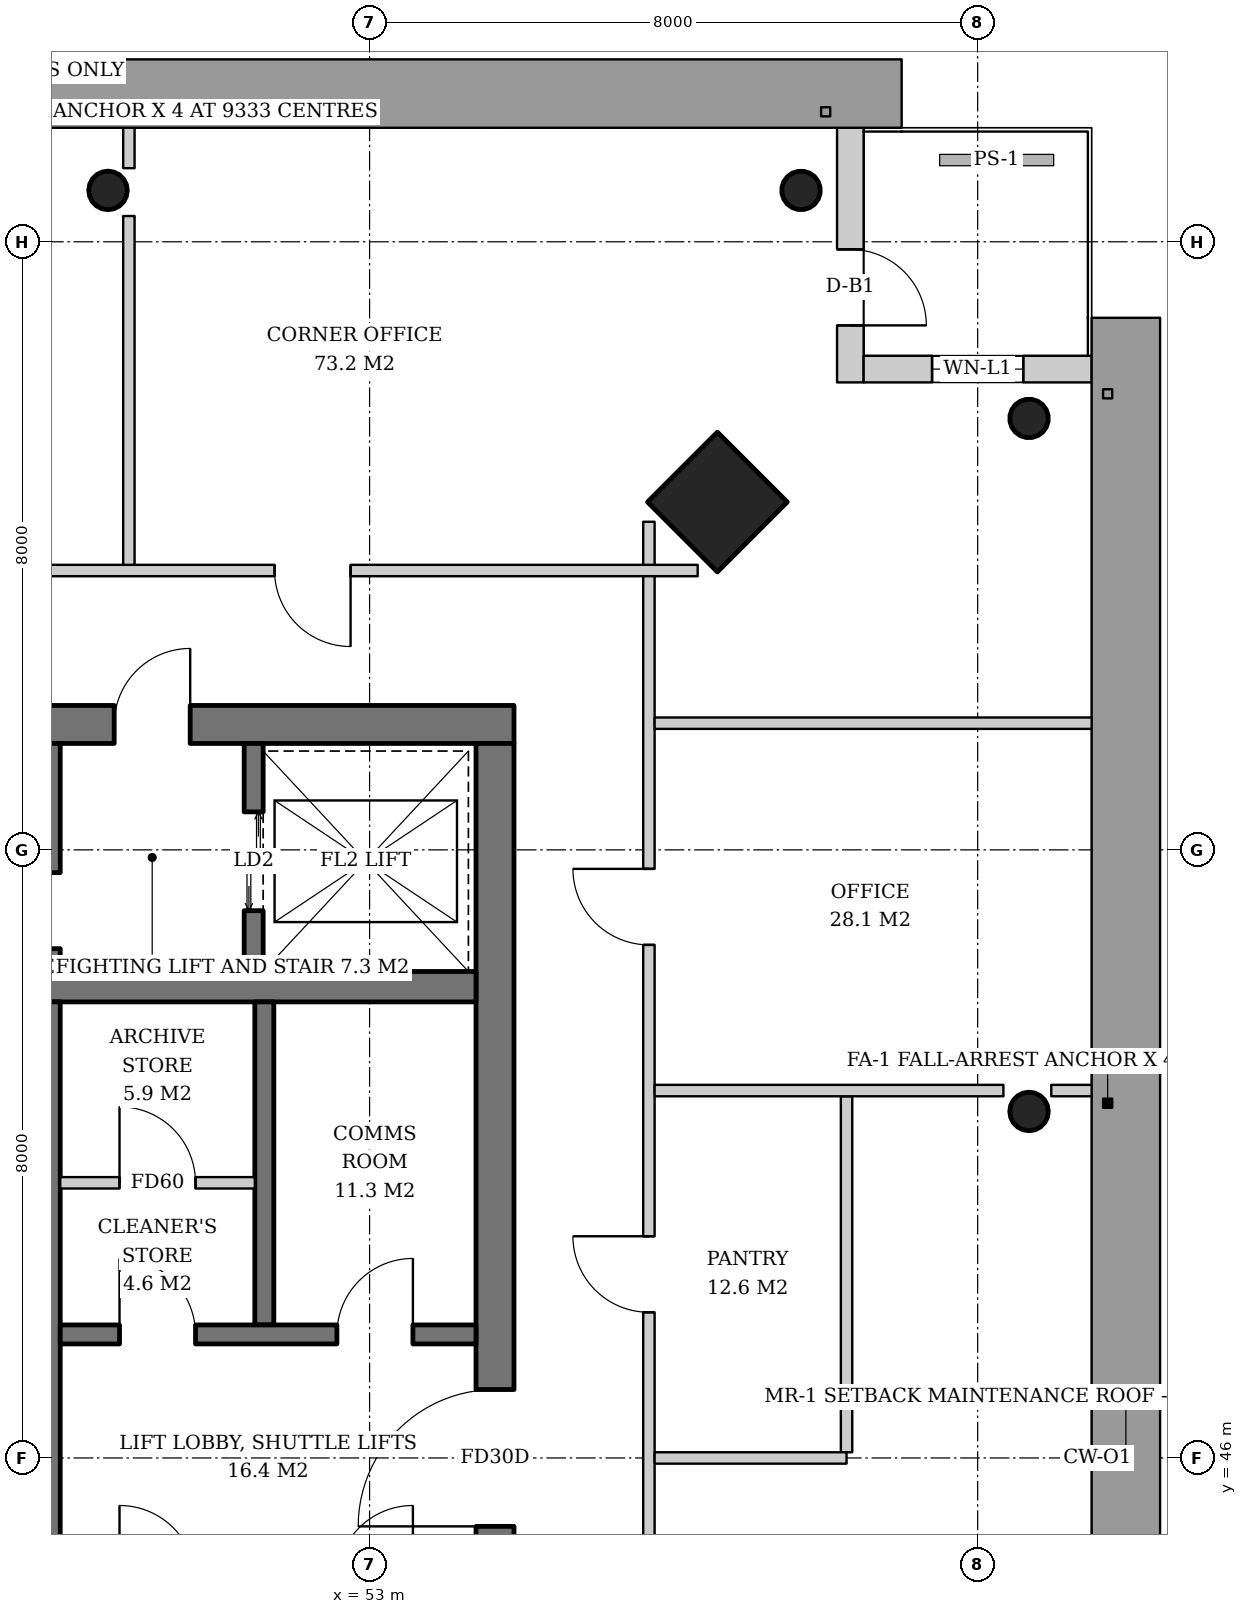
"""IFC4 building model, lengths in metres.
Left out: names, types, materials, properties, quantities, classifications, styles, units other than length and angle.
Written with IfcOpenShell. Run it as: python <this file> out.ifc"""

import sys

from ifc_helpers import new_model, si_unit, direction, frame, frame_2d, origin, origin_2d, place, context, subcontext, project, spatial, rectangle, hollow_circle, extrude, element, fill, save


model = new_model("IFC4")
c1 = context("Model", 3, precision=1e-05, world=origin(), true_north=direction((0.0, 1.0)))
c2 = subcontext(c1, "Body", "Model", "MODEL_VIEW")
j1 = project(units=[si_unit("LENGTHUNIT", "METRE"), si_unit("PLANEANGLEUNIT", "RADIAN")], contexts=[c1])
p1 = place(None, origin())
s1 = spatial("IfcSite", under=j1, at=p1, CompositionType="ELEMENT")
p2 = place(p1, origin())
s2 = spatial("IfcBuilding", under=s1, at=p2, CompositionType="ELEMENT")
p3 = place(p2, frame((0.0, 0.0, 249.0)))
s3 = spatial("IfcBuildingStorey", under=s2, at=p3, CompositionType="ELEMENT", Elevation=249.0)
p4 = place(p3, frame((57.614, 58.614, 0.0), z_axis=(-0.031898107953, -0.031898107953, 0.998981992539), x_axis=(0.707106781187, -0.707106781187, 0.0)))
e1 = element("IfcColumn", 1, at=p4, inside=s3, PredefinedType="COLUMN", context=c2, shape_type="SweptSolid", body=[
    extrude(rectangle(XDim=1.3, YDim=1.3, at=origin_2d()), origin(), (0.0, 0.0, 1.0), 3.804),
])
p5 = place(p3, frame((61.714, 59.714, 0.0), z_axis=(-0.031962158256, -0.031962158256, 0.998977898093), x_axis=(0.707106781187, -0.707106781187, 0.0)))
e2 = element("IfcColumn", 2, at=p5, inside=s3, PredefinedType="COLUMN", context=c2, shape_type="SweptSolid", body=[
    extrude(hollow_circle(Radius=0.254, WallThickness=0.02, at=origin_2d()), origin(), (0.0, 0.0, 1.0), 3.804),
])
p6 = place(p3, frame((61.714, 50.572, 0.0), z_axis=(-0.031976680097, -0.010658893366, 0.999431778523), x_axis=(0.316227766017, -0.948683298051, 0.0)))
e3 = element("IfcColumn", 3, at=p6, inside=s3, PredefinedType="COLUMN", context=c2, shape_type="SweptSolid", body=[
    extrude(hollow_circle(Radius=0.254, WallThickness=0.02, at=origin_2d()), origin(), (0.0, 0.0, 1.0), 3.802),
])
p7 = place(p3, frame((58.714, 62.714, 0.0), z_axis=(-0.031962158256, -0.031962158256, 0.998977898093), x_axis=(0.707106781187, -0.707106781187, 0.0)))
e4 = element("IfcColumn", 4, at=p7, inside=s3, PredefinedType="COLUMN", context=c2, shape_type="SweptSolid", body=[
    extrude(hollow_circle(Radius=0.254, WallThickness=0.02, at=origin_2d()), origin(), (0.0, 0.0, 1.0), 3.804),
])
p8 = place(p3, frame((49.572, 62.714, 0.0), z_axis=(-0.010658893366, -0.031976680097, 0.999431778523), x_axis=(0.948683298051, -0.316227766017, 0.0)))
e5 = element("IfcColumn", 5, at=p8, inside=s3, PredefinedType="COLUMN", context=c2, shape_type="SweptSolid", body=[
    extrude(hollow_circle(Radius=0.254, WallThickness=0.02, at=origin_2d()), origin(), (0.0, 0.0, 1.0), 3.802),
])
p9 = place(p3, frame((35.1, 55.65, 0.0), z_axis=(0.0, 0.0, 1.0), x_axis=(1.0, 0.0, 0.0)))
e6 = element("IfcWall", 6, at=p9, inside=s3, PredefinedType="SHEAR", context=c2, shape_type="SweptSolid", body=[
    extrude(rectangle(XDim=19.8, YDim=0.5, at=frame_2d((9.9, 0.0))), origin(), (0.0, 0.0, 1.0), 3.8),
])
p10 = place(p9, frame((14.54, 0.0, 0.0)))
e7 = element("IfcOpeningElement", 7, at=p10, cuts=e6, PredefinedType="OPENING", context=c2, shape_type="SweptSolid", body=[
    extrude(rectangle(XDim=1.0, YDim=2.1, at=frame_2d((0.5, 1.05))), frame((0.0, 0.26, 0.0), z_axis=(0.0, -1.0, 0.0), x_axis=(1.0, 0.0, 0.0)), (0.0, 0.0, 1.0), 0.52),
])
p11 = place(p9, frame((0.77, 0.0, 0.0)))
e8 = element("IfcOpeningElement", 8, at=p11, cuts=e6, PredefinedType="OPENING", context=c2, shape_type="SweptSolid", body=[
    extrude(rectangle(XDim=1.0, YDim=2.1, at=frame_2d((0.5, 1.05))), frame((0.0, 0.26, 0.0), z_axis=(0.0, -1.0, 0.0), x_axis=(1.0, 0.0, 0.0)), (0.0, 0.0, 1.0), 0.52),
])
p12 = place(p9, frame((2.375, 0.0, 0.0)))
e9 = element("IfcOpeningElement", 9, at=p12, cuts=e6, PredefinedType="OPENING", context=c2, shape_type="SweptSolid", body=[
    extrude(rectangle(XDim=1.0, YDim=2.1, at=frame_2d((0.5, 1.05))), frame((0.0, 0.26, 0.0), z_axis=(0.0, -1.0, 0.0), x_axis=(1.0, 0.0, 0.0)), (0.0, 0.0, 1.0), 0.52),
])
p13 = place(p9, frame((3.99, 0.0, 0.0)))
e10 = element("IfcOpeningElement", 10, at=p13, cuts=e6, PredefinedType="OPENING", context=c2, shape_type="SweptSolid", body=[
    extrude(rectangle(XDim=1.0, YDim=2.1, at=frame_2d((0.5, 1.05))), frame((0.0, 0.26, 0.0), z_axis=(0.0, -1.0, 0.0), x_axis=(1.0, 0.0, 0.0)), (0.0, 0.0, 1.0), 0.52),
])
p14 = place(p3, frame((54.65, 36.6, 0.0), z_axis=(0.0, 0.0, 1.0), x_axis=(0.0, 1.0, 0.0)))
e11 = element("IfcWall", 11, at=p14, inside=s3, PredefinedType="SHEAR", context=c2, shape_type="SweptSolid", body=[
    extrude(rectangle(XDim=18.8, YDim=0.5, at=frame_2d((9.4, 0.0))), origin(), (0.0, 0.0, 1.0), 3.8),
])
p15 = place(p14, frame((8.5, 0.0, 0.0)))
e12 = element("IfcOpeningElement", 12, at=p15, cuts=e11, PredefinedType="OPENING", context=c2, shape_type="SweptSolid", body=[
    extrude(rectangle(XDim=1.8, YDim=2.4, at=frame_2d((0.9, 1.2))), frame((0.0, 0.26, 0.0), z_axis=(0.0, -1.0, 0.0), x_axis=(1.0, 0.0, 0.0)), (0.0, 0.0, 1.0), 0.52),
])
p16 = place(p3, frame((35.6, 52.2, 0.0), z_axis=(0.0, 0.0, 1.0), x_axis=(1.0, 0.0, 0.0)))
e13 = element("IfcWall", 13, at=p16, inside=s3, PredefinedType="SHEAR", context=c2, shape_type="SweptSolid", body=[
    extrude(rectangle(XDim=18.8, YDim=0.4, at=frame_2d((9.4, 0.0))), origin(), (0.0, 0.0, 1.0), 3.8),
])
p17 = place(p3, frame((48.73, 40.0, 0.0), z_axis=(0.0, 0.0, 1.0), x_axis=(0.0, 1.0, 0.0)))
e14 = element("IfcWall", 14, at=p17, inside=s3, PredefinedType="SHEAR", context=c2, shape_type="SweptSolid", body=[
    extrude(rectangle(XDim=12.0, YDim=0.4, at=frame_2d((6.0, 0.0))), origin(), (0.0, 0.0, 1.0), 3.8),
])
p18 = place(p3, frame((48.73, 52.4, 0.0), z_axis=(0.0, 0.0, 1.0), x_axis=(0.0, 1.0, 0.0)))
e15 = element("IfcWall", 15, at=p18, inside=s3, PredefinedType="SHEAR", context=c2, shape_type="SweptSolid", body=[
    extrude(rectangle(XDim=3.0, YDim=0.4, at=frame_2d((1.5, 0.0))), origin(), (0.0, 0.0, 1.0), 3.8),
])
p19 = place(p18, frame((0.3, 0.0, 0.0)))
e16 = element("IfcOpeningElement", 16, at=p19, cuts=e15, PredefinedType="OPENING", context=c2, shape_type="SweptSolid", body=[
    extrude(rectangle(XDim=1.0, YDim=2.1, at=frame_2d((0.5, 1.05))), frame((0.0, 0.21, 0.0), z_axis=(0.0, -1.0, 0.0), x_axis=(1.0, 0.0, 0.0)), (0.0, 0.0, 1.0), 0.42),
])
p20 = place(p3, frame((59.325, 63.5, 0.0), z_axis=(0.0, 0.0, 1.0), x_axis=(0.0, -1.0, 0.0)))
e17 = element("IfcWall", 17, at=p20, inside=s3, PredefinedType="SOLIDWALL", context=c2, shape_type="SweptSolid", body=[
    extrude(rectangle(XDim=3.35, YDim=0.35, at=frame_2d((1.675, 0.0))), origin(), (0.0, 0.0, 1.0), 3.62),
])
p21 = place(p20, frame((1.6, 0.0, 0.0)))
e18 = element("IfcOpeningElement", 18, at=p21, cuts=e17, PredefinedType="OPENING", context=c2, shape_type="SweptSolid", body=[
    extrude(rectangle(XDim=1.0, YDim=2.4, at=frame_2d((0.5, 1.2))), frame((0.0, 0.185, 0.0), z_axis=(0.0, -1.0, 0.0), x_axis=(1.0, 0.0, 0.0)), (0.0, 0.0, 1.0), 0.37),
])
p22 = place(p3, frame((59.5, 60.325, 0.0), z_axis=(0.0, 0.0, 1.0), x_axis=(1.0, 0.0, 0.0)))
e19 = element("IfcWall", 19, at=p22, inside=s3, PredefinedType="SOLIDWALL", context=c2, shape_type="SweptSolid", body=[
    extrude(rectangle(XDim=3.0, YDim=0.35, at=frame_2d((1.5, 0.0))), origin(), (0.0, 0.0, 1.0), 3.62),
])
p23 = place(p22, frame((0.9, 0.0, 0.6)))
e20 = element("IfcOpeningElement", 20, at=p23, cuts=e19, PredefinedType="OPENING", context=c2, shape_type="SweptSolid", body=[
    extrude(rectangle(XDim=1.2, YDim=2.55, at=frame_2d((0.6, 1.275))), frame((0.0, 0.185, 0.0), z_axis=(0.0, -1.0, 0.0), x_axis=(1.0, 0.0, 0.0)), (0.0, 0.0, 1.0), 0.37),
])
p24 = place(p3, frame((51.475, 52.4, 0.0), z_axis=(0.0, 0.0, 1.0), x_axis=(0.0, 1.0, 0.0)))
e21 = element("IfcWall", 21, at=p24, inside=s3, PredefinedType="SHEAR", context=c2, shape_type="SweptSolid", body=[
    extrude(rectangle(XDim=3.0, YDim=0.25, at=frame_2d((1.5, 0.0))), origin(), (0.0, 0.0, 1.0), 3.8),
])
p25 = place(p24, frame((0.8, 0.0, 0.0)))
e22 = element("IfcOpeningElement", 22, at=p25, cuts=e21, PredefinedType="OPENING", context=c2, shape_type="SweptSolid", body=[
    extrude(rectangle(XDim=1.3, YDim=2.2, at=frame_2d((0.65, 1.1))), frame((0.0, 0.135, 0.0), z_axis=(0.0, -1.0, 0.0), x_axis=(1.0, 0.0, 0.0)), (0.0, 0.0, 1.0), 0.27),
])
p26 = place(p3, frame((51.615, 47.75, 0.0), z_axis=(0.0, 0.0, 1.0), x_axis=(0.0, 1.0, 0.0)))
e23 = element("IfcWall", 23, at=p26, inside=s3, PredefinedType="SHEAR", context=c2, shape_type="SweptSolid", body=[
    extrude(rectangle(XDim=4.25, YDim=0.25, at=frame_2d((2.125, 0.0))), origin(), (0.0, 0.0, 1.0), 3.8),
])
p27 = place(p3, frame((48.93, 47.625, 0.0), z_axis=(0.0, 0.0, 1.0), x_axis=(1.0, 0.0, 0.0)))
e24 = element("IfcWall", 24, at=p27, inside=s3, PredefinedType="SHEAR", context=c2, shape_type="SweptSolid", body=[
    extrude(rectangle(XDim=5.47, YDim=0.25, at=frame_2d((2.735, 0.0))), origin(), (0.0, 0.0, 1.0), 3.8),
])
p28 = place(p27, frame((0.78, 0.0, 0.0)))
e25 = element("IfcOpeningElement", 25, at=p28, cuts=e24, PredefinedType="OPENING", context=c2, shape_type="SweptSolid", body=[
    extrude(rectangle(XDim=1.0, YDim=2.1, at=frame_2d((0.5, 1.05))), frame((0.0, 0.135, 0.0), z_axis=(0.0, -1.0, 0.0), x_axis=(1.0, 0.0, 0.0)), (0.0, 0.0, 1.0), 0.27),
])
p29 = place(p27, frame((3.64, 0.0, 0.0)))
e26 = element("IfcOpeningElement", 26, at=p29, cuts=e24, PredefinedType="OPENING", context=c2, shape_type="SweptSolid", body=[
    extrude(rectangle(XDim=1.0, YDim=2.1, at=frame_2d((0.5, 1.05))), frame((0.0, 0.135, 0.0), z_axis=(0.0, -1.0, 0.0), x_axis=(1.0, 0.0, 0.0)), (0.0, 0.0, 1.0), 0.27),
])
p30 = place(p3, frame((48.93, 49.62, 0.0), z_axis=(0.0, 0.0, 1.0), x_axis=(1.0, 0.0, 0.0)))
e27 = element("IfcWall", 27, at=p30, inside=s3, PredefinedType="SOLIDWALL", context=c2, shape_type="SweptSolid", body=[
    extrude(rectangle(XDim=2.56, YDim=0.15, at=frame_2d((1.28, 0.0))), origin(), (0.0, 0.0, 1.0), 3.62),
])
p31 = place(p30, frame((0.78, 0.0, 0.0)))
e28 = element("IfcOpeningElement", 28, at=p31, cuts=e27, PredefinedType="OPENING", context=c2, shape_type="SweptSolid", body=[
    extrude(rectangle(XDim=1.0, YDim=2.1, at=frame_2d((0.5, 1.05))), frame((0.0, 0.085, 0.0), z_axis=(0.0, -1.0, 0.0), x_axis=(1.0, 0.0, 0.0)), (0.0, 0.0, 1.0), 0.17),
])
p32 = place(p3, frame((59.275, 46.075, 0.0), z_axis=(0.0, 0.0, 1.0), x_axis=(0.0, 1.0, 0.0)))
e29 = element("IfcWall", 29, at=p32, inside=s3, PredefinedType="PARTITIONING", context=c2, shape_type="SweptSolid", body=[
    extrude(rectangle(XDim=4.683, YDim=0.15, at=frame_2d((2.342, 0.0))), origin(), (0.0, 0.0, 1.0), 3.12),
])
p33 = place(p3, frame((56.675, 33.684, 0.0), z_axis=(0.0, 0.0, 1.0), x_axis=(0.0, 1.0, 0.0)))
e30 = element("IfcWall", 30, at=p33, inside=s3, PredefinedType="PARTITIONING", context=c2, shape_type="SweptSolid", body=[
    extrude(rectangle(XDim=24.633, YDim=0.15, at=frame_2d((12.316, 0.0))), origin(), (0.0, 0.0, 1.0), 3.02),
])
p34 = place(p33, frame((4.566, 0.0, 0.0)))
e31 = element("IfcOpeningElement", 31, at=p34, cuts=e30, PredefinedType="OPENING", context=c2, shape_type="SweptSolid", body=[
    extrude(rectangle(XDim=1.0, YDim=2.1, at=frame_2d((0.5, 1.05))), frame((0.0, 0.085, 0.0), z_axis=(0.0, -1.0, 0.0), x_axis=(1.0, 0.0, 0.0)), (0.0, 0.0, 1.0), 0.17),
])
p35 = place(p33, frame((9.4, 0.0, 0.0)))
e32 = element("IfcOpeningElement", 32, at=p35, cuts=e30, PredefinedType="OPENING", context=c2, shape_type="SweptSolid", body=[
    extrude(rectangle(XDim=1.0, YDim=2.1, at=frame_2d((0.5, 1.05))), frame((0.0, 0.085, 0.0), z_axis=(0.0, -1.0, 0.0), x_axis=(1.0, 0.0, 0.0)), (0.0, 0.0, 1.0), 0.17),
])
p36 = place(p33, frame((14.233, 0.0, 0.0)))
e33 = element("IfcOpeningElement", 33, at=p36, cuts=e30, PredefinedType="OPENING", context=c2, shape_type="SweptSolid", body=[
    extrude(rectangle(XDim=1.0, YDim=2.1, at=frame_2d((0.5, 1.05))), frame((0.0, 0.085, 0.0), z_axis=(0.0, -1.0, 0.0), x_axis=(1.0, 0.0, 0.0)), (0.0, 0.0, 1.0), 0.17),
])
p37 = place(p33, frame((19.066, 0.0, 0.0)))
e34 = element("IfcOpeningElement", 34, at=p37, cuts=e30, PredefinedType="OPENING", context=c2, shape_type="SweptSolid", body=[
    extrude(rectangle(XDim=1.0, YDim=2.1, at=frame_2d((0.5, 1.05))), frame((0.0, 0.085, 0.0), z_axis=(0.0, -1.0, 0.0), x_axis=(1.0, 0.0, 0.0)), (0.0, 0.0, 1.0), 0.17),
])
p38 = place(p3, frame((56.75, 46.0, 0.0), z_axis=(0.0, 0.0, 1.0), x_axis=(1.0, 0.0, 0.0)))
e35 = element("IfcWall", 35, at=p38, inside=s3, PredefinedType="PARTITIONING", context=c2, shape_type="SweptSolid", body=[
    extrude(rectangle(XDim=2.525, YDim=0.15, at=frame_2d((1.262, 0.0))), origin(), (0.0, 0.0, 1.0), 3.62),
])
p39 = place(p3, frame((56.75, 50.833, 0.0), z_axis=(0.0, 0.0, 1.0), x_axis=(1.0, 0.0, 0.0)))
e36 = element("IfcWall", 36, at=p39, inside=s3, PredefinedType="PARTITIONING", context=c2, shape_type="SweptSolid", body=[
    extrude(rectangle(XDim=4.589, YDim=0.15, at=frame_2d((2.294, 0.0))), origin(), (0.0, 0.0, 1.0), 3.62),
])
p40 = place(p3, frame((61.968, 50.833, 0.0), z_axis=(0.0, 0.0, 1.0), x_axis=(1.0, 0.0, 0.0)))
e37 = element("IfcWall", 37, at=p40, inside=s3, PredefinedType="PARTITIONING", context=c2, shape_type="SweptSolid", body=[
    extrude(rectangle(XDim=0.572, YDim=0.15, at=frame_2d((0.286, 0.0))), origin(), (0.0, 0.0, 1.0), 3.62),
])
p41 = place(p3, frame((56.75, 55.667, 0.0), z_axis=(0.0, 0.0, 1.0), x_axis=(1.0, 0.0, 0.0)))
e38 = element("IfcWall", 38, at=p41, inside=s3, PredefinedType="PARTITIONING", context=c2, shape_type="SweptSolid", body=[
    extrude(rectangle(XDim=5.79, YDim=0.15, at=frame_2d((2.895, 0.0))), origin(), (0.0, 0.0, 1.0), 3.12),
])
p42 = place(p3, frame((57.316, 57.675, 0.0), z_axis=(0.0, 0.0, 1.0), x_axis=(-1.0, 0.0, 0.0)))
e39 = element("IfcWall", 39, at=p42, inside=s3, PredefinedType="PARTITIONING", context=c2, shape_type="SweptSolid", body=[
    extrude(rectangle(XDim=24.633, YDim=0.15, at=frame_2d((12.316, 0.0))), origin(), (0.0, 0.0, 1.0), 3.02),
])
p43 = place(p42, frame((4.566, 0.0, 0.0)))
e40 = element("IfcOpeningElement", 40, at=p43, cuts=e39, PredefinedType="OPENING", context=c2, shape_type="SweptSolid", body=[
    extrude(rectangle(XDim=1.0, YDim=2.1, at=frame_2d((0.5, 1.05))), frame((0.0, 0.085, 0.0), z_axis=(0.0, -1.0, 0.0), x_axis=(1.0, 0.0, 0.0)), (0.0, 0.0, 1.0), 0.17),
])
p44 = place(p42, frame((9.4, 0.0, 0.0)))
e41 = element("IfcOpeningElement", 41, at=p44, cuts=e39, PredefinedType="OPENING", context=c2, shape_type="SweptSolid", body=[
    extrude(rectangle(XDim=1.0, YDim=2.1, at=frame_2d((0.5, 1.05))), frame((0.0, 0.085, 0.0), z_axis=(0.0, -1.0, 0.0), x_axis=(1.0, 0.0, 0.0)), (0.0, 0.0, 1.0), 0.17),
])
p45 = place(p42, frame((19.066, 0.0, 0.0)))
e42 = element("IfcOpeningElement", 42, at=p45, cuts=e39, PredefinedType="OPENING", context=c2, shape_type="SweptSolid", body=[
    extrude(rectangle(XDim=1.0, YDim=2.1, at=frame_2d((0.5, 1.05))), frame((0.0, 0.085, 0.0), z_axis=(0.0, -1.0, 0.0), x_axis=(1.0, 0.0, 0.0)), (0.0, 0.0, 1.0), 0.17),
])
p46 = place(p3, frame((49.833, 57.75, 0.0), z_axis=(0.0, 0.0, 1.0), x_axis=(0.0, 1.0, 0.0)))
e43 = element("IfcWall", 43, at=p46, inside=s3, PredefinedType="PARTITIONING", context=c2, shape_type="SweptSolid", body=[
    extrude(rectangle(XDim=4.589, YDim=0.15, at=frame_2d((2.294, 0.0))), origin(), (0.0, 0.0, 1.0), 3.62),
])
p47 = place(p3, frame((49.833, 62.968, 0.0), z_axis=(0.0, 0.0, 1.0), x_axis=(0.0, 1.0, 0.0)))
e44 = element("IfcWall", 44, at=p47, inside=s3, PredefinedType="PARTITIONING", context=c2, shape_type="SweptSolid", body=[
    extrude(rectangle(XDim=0.572, YDim=0.15, at=frame_2d((0.286, 0.0))), origin(), (0.0, 0.0, 1.0), 3.62),
])
p48 = place(p21, origin())
e45 = element("IfcDoor", 45, at=p48, inside=s3, OperationType="SINGLE_SWING_RIGHT", PredefinedType="DOOR", context=c2, shape_type="SweptSolid", body=[
    extrude(rectangle(XDim=1.0, YDim=2.4, at=frame_2d((0.5, 1.2))), frame((0.0, 0.025, 0.0), z_axis=(0.0, -1.0, 0.0), x_axis=(1.0, 0.0, 0.0)), (0.0, 0.0, 1.0), 0.05),
])
fill(e18, e45)
p49 = place(p23, origin())
e46 = element("IfcWindow", 46, at=p49, inside=s3, PartitioningType="SINGLE_PANEL", PredefinedType="WINDOW", context=c2, shape_type="SweptSolid", body=[
    extrude(rectangle(XDim=1.2, YDim=2.55, at=frame_2d((0.6, 1.275))), frame((0.0, 0.03, 0.0), z_axis=(0.0, -1.0, 0.0), x_axis=(1.0, 0.0, 0.0)), (0.0, 0.0, 1.0), 0.06),
])
fill(e20, e46)
p50 = place(p25, origin())
e47 = element("IfcDoor", 47, at=p50, inside=s3, OperationType="DOUBLE_DOOR_SLIDING", PredefinedType="DOOR", context=c2, shape_type="SweptSolid", body=[
    extrude(rectangle(XDim=1.3, YDim=2.2, at=frame_2d((0.65, 1.1))), frame((0.0, 0.025, 0.0), z_axis=(0.0, -1.0, 0.0), x_axis=(1.0, 0.0, 0.0)), (0.0, 0.0, 1.0), 0.05),
])
fill(e22, e47)
p51 = place(p28, origin())
e48 = element("IfcDoor", 48, at=p51, inside=s3, OperationType="SINGLE_SWING_LEFT", PredefinedType="DOOR", context=c2, shape_type="SweptSolid", body=[
    extrude(rectangle(XDim=1.0, YDim=2.1, at=frame_2d((0.5, 1.05))), frame((0.0, 0.025, 0.0), z_axis=(0.0, -1.0, 0.0), x_axis=(1.0, 0.0, 0.0)), (0.0, 0.0, 1.0), 0.05),
])
fill(e25, e48)
p52 = place(p29, origin())
e49 = element("IfcDoor", 49, at=p52, inside=s3, OperationType="SINGLE_SWING_RIGHT", PredefinedType="DOOR", context=c2, shape_type="SweptSolid", body=[
    extrude(rectangle(XDim=1.0, YDim=2.1, at=frame_2d((0.5, 1.05))), frame((0.0, 0.025, 0.0), z_axis=(0.0, -1.0, 0.0), x_axis=(1.0, 0.0, 0.0)), (0.0, 0.0, 1.0), 0.05),
])
fill(e26, e49)
p53 = place(p31, origin())
e50 = element("IfcDoor", 50, at=p53, inside=s3, OperationType="SINGLE_SWING_LEFT", PredefinedType="DOOR", context=c2, shape_type="SweptSolid", body=[
    extrude(rectangle(XDim=1.0, YDim=2.1, at=frame_2d((0.5, 1.05))), frame((0.0, 0.025, 0.0), z_axis=(0.0, -1.0, 0.0), x_axis=(1.0, 0.0, 0.0)), (0.0, 0.0, 1.0), 0.05),
])
fill(e28, e50)
p54 = place(p10, origin())
e51 = element("IfcDoor", 51, at=p54, inside=s3, OperationType="SINGLE_SWING_RIGHT", PredefinedType="DOOR", context=c2, shape_type="SweptSolid", body=[
    extrude(rectangle(XDim=1.0, YDim=2.1, at=frame_2d((0.5, 1.05))), frame((0.0, 0.025, 0.0), z_axis=(0.0, -1.0, 0.0), x_axis=(1.0, 0.0, 0.0)), (0.0, 0.0, 1.0), 0.05),
])
fill(e7, e51)
p55 = place(p15, origin())
e52 = element("IfcDoor", 52, at=p55, inside=s3, OperationType="DOUBLE_DOOR_SINGLE_SWING", PredefinedType="DOOR", context=c2, shape_type="SweptSolid", body=[
    extrude(rectangle(XDim=1.8, YDim=2.4, at=frame_2d((0.9, 1.2))), frame((0.0, 0.025, 0.0), z_axis=(0.0, -1.0, 0.0), x_axis=(1.0, 0.0, 0.0)), (0.0, 0.0, 1.0), 0.05),
])
fill(e12, e52)
p56 = place(p36, origin())
e53 = element("IfcDoor", 53, at=p56, inside=s3, OperationType="SINGLE_SWING_RIGHT", PredefinedType="DOOR", context=c2, shape_type="SweptSolid", body=[
    extrude(rectangle(XDim=1.0, YDim=2.1, at=frame_2d((0.5, 1.05))), frame((0.0, 0.025, 0.0), z_axis=(0.0, -1.0, 0.0), x_axis=(1.0, 0.0, 0.0)), (0.0, 0.0, 1.0), 0.05),
])
fill(e33, e53)
p57 = place(p37, origin())
e54 = element("IfcDoor", 54, at=p57, inside=s3, OperationType="SINGLE_SWING_RIGHT", PredefinedType="DOOR", context=c2, shape_type="SweptSolid", body=[
    extrude(rectangle(XDim=1.0, YDim=2.1, at=frame_2d((0.5, 1.05))), frame((0.0, 0.025, 0.0), z_axis=(0.0, -1.0, 0.0), x_axis=(1.0, 0.0, 0.0)), (0.0, 0.0, 1.0), 0.05),
])
fill(e34, e54)
p58 = place(p43, origin())
e55 = element("IfcDoor", 55, at=p58, inside=s3, OperationType="SINGLE_SWING_LEFT", PredefinedType="DOOR", context=c2, shape_type="SweptSolid", body=[
    extrude(rectangle(XDim=1.0, YDim=2.1, at=frame_2d((0.5, 1.05))), frame((0.0, 0.025, 0.0), z_axis=(0.0, -1.0, 0.0), x_axis=(1.0, 0.0, 0.0)), (0.0, 0.0, 1.0), 0.05),
])
fill(e40, e55)
save(model, sys.argv[1])
